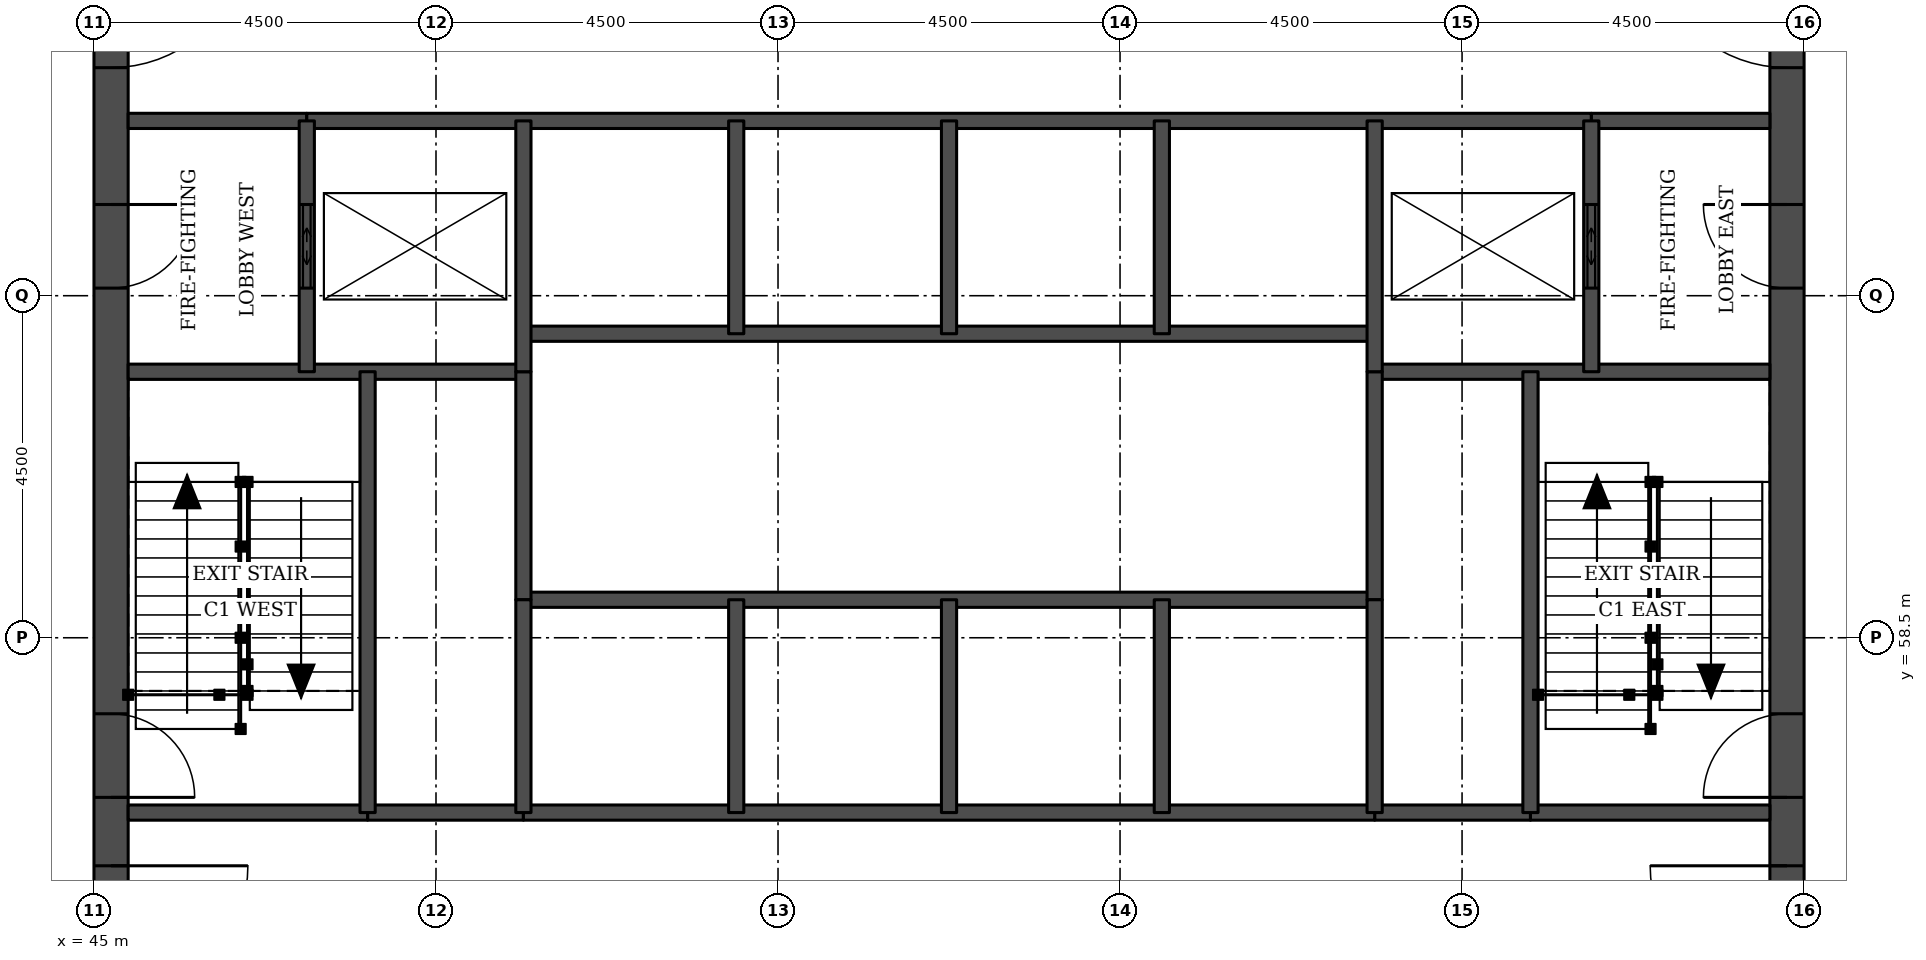
"""IFC4 building model, lengths in metres.
Left out: names, types, materials, properties, quantities, classifications, styles, units other than length and angle.
Written with IfcOpenShell. Run it as: python <this file> out.ifc"""

import sys

from ifc_helpers import new_model, si_unit, direction, frame, frame_2d, origin, place, context, subcontext, project, spatial, rectangle, extrude, element, fill, save


model = new_model("IFC4")
c1 = context("Model", 3, precision=1e-05, world=origin(), true_north=direction((0.0, 1.0)))
c2 = subcontext(c1, "Body", "Model", "MODEL_VIEW")
j1 = project(units=[si_unit("LENGTHUNIT", "METRE"), si_unit("PLANEANGLEUNIT", "RADIAN")], contexts=[c1])
p1 = place(None, origin())
s1 = spatial("IfcSite", under=j1, at=p1, CompositionType="ELEMENT")
p2 = place(p1, origin())
s2 = spatial("IfcBuilding", under=s1, at=p2, CompositionType="ELEMENT")
p3 = place(p2, frame((0.0, 0.0, 127.0)))
s3 = spatial("IfcBuildingStorey", under=s2, at=p3, CompositionType="ELEMENT", Elevation=127.0)
p4 = place(p3, frame((45.225, 49.5, 0.0), z_axis=(0.0, 0.0, 1.0), x_axis=(0.0, 1.0, 0.0)))
e1 = element("IfcWall", 1, at=p4, inside=s3, PredefinedType="SHEAR", context=c2, shape_type="SweptSolid", body=[
    extrude(rectangle(XDim=22.5, YDim=0.45, at=frame_2d((11.25, 0.0))), origin(), (0.0, 0.0, 1.0), 3.7),
])
p5 = place(p4, frame((4.2, 0.0, 0.0)))
e2 = element("IfcOpeningElement", 2, at=p5, cuts=e1, PredefinedType="OPENING", context=c2, shape_type="SweptSolid", body=[
    extrude(rectangle(XDim=1.8, YDim=2.1, at=frame_2d((0.9, 1.05))), frame((0.0, 0.235, 0.0), z_axis=(0.0, -1.0, 0.0), x_axis=(1.0, 0.0, 0.0)), (0.0, 0.0, 1.0), 0.47),
])
p6 = place(p4, frame((6.9, 0.0, 0.0)))
e3 = element("IfcOpeningElement", 3, at=p6, cuts=e1, PredefinedType="OPENING", context=c2, shape_type="SweptSolid", body=[
    extrude(rectangle(XDim=1.1, YDim=2.1, at=frame_2d((0.55, 1.05))), frame((0.0, 0.235, 0.0), z_axis=(0.0, -1.0, 0.0), x_axis=(1.0, 0.0, 0.0)), (0.0, 0.0, 1.0), 0.47),
])
p7 = place(p4, frame((13.6, 0.0, 0.0)))
e4 = element("IfcOpeningElement", 4, at=p7, cuts=e1, PredefinedType="OPENING", context=c2, shape_type="SweptSolid", body=[
    extrude(rectangle(XDim=1.1, YDim=2.1, at=frame_2d((0.55, 1.05))), frame((0.0, 0.235, 0.0), z_axis=(0.0, -1.0, 0.0), x_axis=(1.0, 0.0, 0.0)), (0.0, 0.0, 1.0), 0.47),
])
p8 = place(p4, frame((16.5, 0.0, 0.0)))
e5 = element("IfcOpeningElement", 5, at=p8, cuts=e1, PredefinedType="OPENING", context=c2, shape_type="SweptSolid", body=[
    extrude(rectangle(XDim=1.8, YDim=2.1, at=frame_2d((0.9, 1.05))), frame((0.0, 0.235, 0.0), z_axis=(0.0, -1.0, 0.0), x_axis=(1.0, 0.0, 0.0)), (0.0, 0.0, 1.0), 0.47),
])
p9 = place(p3, frame((67.275, 49.5, 0.0), z_axis=(0.0, 0.0, 1.0), x_axis=(0.0, 1.0, 0.0)))
e6 = element("IfcWall", 6, at=p9, inside=s3, PredefinedType="SHEAR", context=c2, shape_type="SweptSolid", body=[
    extrude(rectangle(XDim=22.5, YDim=0.45, at=frame_2d((11.25, 0.0))), origin(), (0.0, 0.0, 1.0), 3.7),
])
p10 = place(p9, frame((4.2, 0.0, 0.0)))
e7 = element("IfcOpeningElement", 7, at=p10, cuts=e6, PredefinedType="OPENING", context=c2, shape_type="SweptSolid", body=[
    extrude(rectangle(XDim=1.8, YDim=2.1, at=frame_2d((0.9, 1.05))), frame((0.0, 0.235, 0.0), z_axis=(0.0, -1.0, 0.0), x_axis=(1.0, 0.0, 0.0)), (0.0, 0.0, 1.0), 0.47),
])
p11 = place(p9, frame((6.9, 0.0, 0.0)))
e8 = element("IfcOpeningElement", 8, at=p11, cuts=e6, PredefinedType="OPENING", context=c2, shape_type="SweptSolid", body=[
    extrude(rectangle(XDim=1.1, YDim=2.1, at=frame_2d((0.55, 1.05))), frame((0.0, 0.235, 0.0), z_axis=(0.0, -1.0, 0.0), x_axis=(1.0, 0.0, 0.0)), (0.0, 0.0, 1.0), 0.47),
])
p12 = place(p9, frame((13.6, 0.0, 0.0)))
e9 = element("IfcOpeningElement", 9, at=p12, cuts=e6, PredefinedType="OPENING", context=c2, shape_type="SweptSolid", body=[
    extrude(rectangle(XDim=1.1, YDim=2.1, at=frame_2d((0.55, 1.05))), frame((0.0, 0.235, 0.0), z_axis=(0.0, -1.0, 0.0), x_axis=(1.0, 0.0, 0.0)), (0.0, 0.0, 1.0), 0.47),
])
p13 = place(p9, frame((16.5, 0.0, 0.0)))
e10 = element("IfcOpeningElement", 10, at=p13, cuts=e6, PredefinedType="OPENING", context=c2, shape_type="SweptSolid", body=[
    extrude(rectangle(XDim=1.8, YDim=2.1, at=frame_2d((0.9, 1.05))), frame((0.0, 0.235, 0.0), z_axis=(0.0, -1.0, 0.0), x_axis=(1.0, 0.0, 0.0)), (0.0, 0.0, 1.0), 0.47),
])
for number, where, z_axis, x_axis in (
    (11, (48.6, 56.2, 0.0), (0.0, 0.0, 1.0), (1.0, 0.0, 0.0)),
    (12, (61.85, 56.2, 0.0), (0.0, 0.0, 1.0), (1.0, 0.0, 0.0)),
):
    element("IfcWall", number, at=place(p3, frame(where, z_axis=z_axis, x_axis=x_axis)), inside=s3, PredefinedType="SOLIDWALL", context=c2, shape_type="SweptSolid", body=[
        extrude(rectangle(XDim=2.05, YDim=0.2, at=frame_2d((1.025, 0.0))), origin(), (0.0, 0.0, 1.0), 3.55),
    ])
p14 = place(p3, frame((45.45, 56.2, 0.0), z_axis=(0.0, 0.0, 1.0), x_axis=(1.0, 0.0, 0.0)))
e13 = element("IfcWall", 13, at=p14, inside=s3, PredefinedType="SOLIDWALL", context=c2, shape_type="SweptSolid", body=[
    extrude(rectangle(XDim=3.15, YDim=0.2, at=frame_2d((1.575, 0.0))), origin(), (0.0, 0.0, 1.0), 3.55),
])
p15 = place(p3, frame((50.65, 56.2, 0.0), z_axis=(0.0, 0.0, 1.0), x_axis=(1.0, 0.0, 0.0)))
e14 = element("IfcWall", 14, at=p15, inside=s3, PredefinedType="SOLIDWALL", context=c2, shape_type="SweptSolid", body=[
    extrude(rectangle(XDim=11.2, YDim=0.2, at=frame_2d((5.6, 0.0))), origin(), (0.0, 0.0, 1.0), 3.55),
])
p16 = place(p3, frame((63.9, 56.2, 0.0), z_axis=(0.0, 0.0, 1.0), x_axis=(1.0, 0.0, 0.0)))
e15 = element("IfcWall", 15, at=p16, inside=s3, PredefinedType="SOLIDWALL", context=c2, shape_type="SweptSolid", body=[
    extrude(rectangle(XDim=3.15, YDim=0.2, at=frame_2d((1.575, 0.0))), origin(), (0.0, 0.0, 1.0), 3.55),
])
p17 = place(p3, frame((50.65, 59.0, 0.0), z_axis=(0.0, 0.0, 1.0), x_axis=(1.0, 0.0, 0.0)))
e16 = element("IfcWall", 16, at=p17, inside=s3, PredefinedType="SOLIDWALL", context=c2, shape_type="SweptSolid", body=[
    extrude(rectangle(XDim=11.2, YDim=0.2, at=frame_2d((5.6, 0.0))), origin(), (0.0, 0.0, 1.0), 3.7),
])
for number, where, z_axis, x_axis in (
    (17, (45.45, 62.0, 0.0), (0.0, 0.0, 1.0), (1.0, 0.0, 0.0)),
    (18, (61.85, 62.0, 0.0), (0.0, 0.0, 1.0), (1.0, 0.0, 0.0)),
):
    element("IfcWall", number, at=place(p3, frame(where, z_axis=z_axis, x_axis=x_axis)), inside=s3, PredefinedType="SOLIDWALL", context=c2, shape_type="SweptSolid", body=[
        extrude(rectangle(XDim=5.2, YDim=0.2, at=frame_2d((2.6, 0.0))), origin(), (0.0, 0.0, 1.0), 3.55),
    ])
p18 = place(p3, frame((50.65, 62.5, 0.0), z_axis=(0.0, 0.0, 1.0), x_axis=(1.0, 0.0, 0.0)))
e19 = element("IfcWall", 19, at=p18, inside=s3, PredefinedType="SOLIDWALL", context=c2, shape_type="SweptSolid", body=[
    extrude(rectangle(XDim=11.2, YDim=0.2, at=frame_2d((5.6, 0.0))), origin(), (0.0, 0.0, 1.0), 3.7),
])
for number, where, z_axis, x_axis in (
    (20, (45.45, 65.3, 0.0), (0.0, 0.0, 1.0), (1.0, 0.0, 0.0)),
    (21, (64.7, 65.3, 0.0), (0.0, 0.0, 1.0), (1.0, 0.0, 0.0)),
):
    element("IfcWall", number, at=place(p3, frame(where, z_axis=z_axis, x_axis=x_axis)), inside=s3, PredefinedType="SOLIDWALL", context=c2, shape_type="SweptSolid", body=[
        extrude(rectangle(XDim=2.35, YDim=0.2, at=frame_2d((1.175, 0.0))), origin(), (0.0, 0.0, 1.0), 3.55),
    ])
p19 = place(p3, frame((47.8, 65.3, 0.0), z_axis=(0.0, 0.0, 1.0), x_axis=(1.0, 0.0, 0.0)))
e22 = element("IfcWall", 22, at=p19, inside=s3, PredefinedType="SOLIDWALL", context=c2, shape_type="SweptSolid", body=[
    extrude(rectangle(XDim=16.9, YDim=0.2, at=frame_2d((8.45, 0.0))), origin(), (0.0, 0.0, 1.0), 3.55),
])
p20 = place(p3, frame((47.8, 62.0, 0.0), z_axis=(0.0, 0.0, 1.0), x_axis=(0.0, 1.0, 0.0)))
e23 = element("IfcWall", 23, at=p20, inside=s3, PredefinedType="SOLIDWALL", context=c2, shape_type="SweptSolid", body=[
    extrude(rectangle(XDim=3.3, YDim=0.2, at=frame_2d((1.65, 0.0))), origin(), (0.0, 0.0, 1.0), 3.55),
])
p21 = place(p20, frame((1.1, 0.0, 0.0)))
e24 = element("IfcOpeningElement", 24, at=p21, cuts=e23, PredefinedType="OPENING", context=c2, shape_type="SweptSolid", body=[
    extrude(rectangle(XDim=1.1, YDim=2.1, at=frame_2d((0.55, 1.05))), frame((0.0, 0.11, 0.0), z_axis=(0.0, -1.0, 0.0), x_axis=(1.0, 0.0, 0.0)), (0.0, 0.0, 1.0), 0.22),
])
p22 = place(p3, frame((48.6, 56.2, 0.0), z_axis=(0.0, 0.0, 1.0), x_axis=(0.0, 1.0, 0.0)))
e25 = element("IfcWall", 25, at=p22, inside=s3, PredefinedType="SOLIDWALL", context=c2, shape_type="SweptSolid", body=[
    extrude(rectangle(XDim=5.8, YDim=0.2, at=frame_2d((2.9, 0.0))), origin(), (0.0, 0.0, 1.0), 3.55),
])
p23 = place(p3, frame((50.65, 59.0, 0.0), z_axis=(0.0, 0.0, 1.0), x_axis=(0.0, 1.0, 0.0)))
e26 = element("IfcWall", 26, at=p23, inside=s3, PredefinedType="SOLIDWALL", context=c2, shape_type="SweptSolid", body=[
    extrude(rectangle(XDim=3.0, YDim=0.2, at=frame_2d((1.5, 0.0))), origin(), (0.0, 0.0, 1.0), 3.7),
])
p24 = place(p3, frame((50.65, 56.2, 0.0), z_axis=(0.0, 0.0, 1.0), x_axis=(0.0, 1.0, 0.0)))
e27 = element("IfcWall", 27, at=p24, inside=s3, PredefinedType="SOLIDWALL", context=c2, shape_type="SweptSolid", body=[
    extrude(rectangle(XDim=2.8, YDim=0.2, at=frame_2d((1.4, 0.0))), origin(), (0.0, 0.0, 1.0), 3.55),
])
p25 = place(p3, frame((50.65, 62.0, 0.0), z_axis=(0.0, 0.0, 1.0), x_axis=(0.0, 1.0, 0.0)))
e28 = element("IfcWall", 28, at=p25, inside=s3, PredefinedType="SOLIDWALL", context=c2, shape_type="SweptSolid", body=[
    extrude(rectangle(XDim=3.3, YDim=0.2, at=frame_2d((1.65, 0.0))), origin(), (0.0, 0.0, 1.0), 3.55),
])
for number, where, z_axis, x_axis in (
    (29, (53.45, 56.2, 0.0), (0.0, 0.0, 1.0), (0.0, 1.0, 0.0)),
    (30, (53.45, 62.5, 0.0), (0.0, 0.0, 1.0), (0.0, 1.0, 0.0)),
    (31, (56.25, 56.2, 0.0), (0.0, 0.0, 1.0), (0.0, 1.0, 0.0)),
    (32, (56.25, 62.5, 0.0), (0.0, 0.0, 1.0), (0.0, 1.0, 0.0)),
    (33, (59.05, 56.2, 0.0), (0.0, 0.0, 1.0), (0.0, 1.0, 0.0)),
    (34, (59.05, 62.5, 0.0), (0.0, 0.0, 1.0), (0.0, 1.0, 0.0)),
):
    element("IfcWall", number, at=place(p3, frame(where, z_axis=z_axis, x_axis=x_axis)), inside=s3, PredefinedType="SOLIDWALL", context=c2, shape_type="SweptSolid", body=[
        extrude(rectangle(XDim=2.8, YDim=0.2, at=frame_2d((1.4, 0.0))), origin(), (0.0, 0.0, 1.0), 3.55),
    ])
p26 = place(p3, frame((61.85, 59.0, 0.0), z_axis=(0.0, 0.0, 1.0), x_axis=(0.0, 1.0, 0.0)))
e35 = element("IfcWall", 35, at=p26, inside=s3, PredefinedType="SOLIDWALL", context=c2, shape_type="SweptSolid", body=[
    extrude(rectangle(XDim=3.0, YDim=0.2, at=frame_2d((1.5, 0.0))), origin(), (0.0, 0.0, 1.0), 3.7),
])
p27 = place(p3, frame((61.85, 56.2, 0.0), z_axis=(0.0, 0.0, 1.0), x_axis=(0.0, 1.0, 0.0)))
e36 = element("IfcWall", 36, at=p27, inside=s3, PredefinedType="SOLIDWALL", context=c2, shape_type="SweptSolid", body=[
    extrude(rectangle(XDim=2.8, YDim=0.2, at=frame_2d((1.4, 0.0))), origin(), (0.0, 0.0, 1.0), 3.55),
])
p28 = place(p3, frame((61.85, 62.0, 0.0), z_axis=(0.0, 0.0, 1.0), x_axis=(0.0, 1.0, 0.0)))
e37 = element("IfcWall", 37, at=p28, inside=s3, PredefinedType="SOLIDWALL", context=c2, shape_type="SweptSolid", body=[
    extrude(rectangle(XDim=3.3, YDim=0.2, at=frame_2d((1.65, 0.0))), origin(), (0.0, 0.0, 1.0), 3.55),
])
p29 = place(p3, frame((63.9, 56.2, 0.0), z_axis=(0.0, 0.0, 1.0), x_axis=(0.0, 1.0, 0.0)))
e38 = element("IfcWall", 38, at=p29, inside=s3, PredefinedType="SOLIDWALL", context=c2, shape_type="SweptSolid", body=[
    extrude(rectangle(XDim=5.8, YDim=0.2, at=frame_2d((2.9, 0.0))), origin(), (0.0, 0.0, 1.0), 3.55),
])
p30 = place(p3, frame((64.7, 62.0, 0.0), z_axis=(0.0, 0.0, 1.0), x_axis=(0.0, 1.0, 0.0)))
e39 = element("IfcWall", 39, at=p30, inside=s3, PredefinedType="SOLIDWALL", context=c2, shape_type="SweptSolid", body=[
    extrude(rectangle(XDim=3.3, YDim=0.2, at=frame_2d((1.65, 0.0))), origin(), (0.0, 0.0, 1.0), 3.55),
])
p31 = place(p30, frame((1.1, 0.0, 0.0)))
e40 = element("IfcOpeningElement", 40, at=p31, cuts=e39, PredefinedType="OPENING", context=c2, shape_type="SweptSolid", body=[
    extrude(rectangle(XDim=1.1, YDim=2.1, at=frame_2d((0.55, 1.05))), frame((0.0, 0.11, 0.0), z_axis=(0.0, -1.0, 0.0), x_axis=(1.0, 0.0, 0.0)), (0.0, 0.0, 1.0), 0.22),
])
p32 = place(p21, origin())
e41 = element("IfcDoor", 41, at=p32, inside=s3, OperationType="DOUBLE_DOOR_SLIDING", PredefinedType="DOOR", context=c2, shape_type="SweptSolid", body=[
    extrude(rectangle(XDim=1.1, YDim=2.1, at=frame_2d((0.55, 1.05))), frame((0.0, 0.025, 0.0), z_axis=(0.0, -1.0, 0.0), x_axis=(1.0, 0.0, 0.0)), (0.0, 0.0, 1.0), 0.05),
])
fill(e24, e41)
p33 = place(p31, origin())
e42 = element("IfcDoor", 42, at=p33, inside=s3, OperationType="DOUBLE_DOOR_SLIDING", PredefinedType="DOOR", context=c2, shape_type="SweptSolid", body=[
    extrude(rectangle(XDim=1.1, YDim=2.1, at=frame_2d((0.55, 1.05))), frame((0.0, 0.025, 0.0), z_axis=(0.0, -1.0, 0.0), x_axis=(1.0, 0.0, 0.0)), (0.0, 0.0, 1.0), 0.05),
])
fill(e40, e42)
p34 = place(p5, frame((1.8, 0.0, 0.0), z_axis=(0.0, 0.0, 1.0), x_axis=(-1.0, 0.0, 0.0)))
e43 = element("IfcDoor", 43, at=p34, inside=s3, OperationType="SINGLE_SWING_LEFT", PredefinedType="DOOR", context=c2, shape_type="SweptSolid", body=[
    extrude(rectangle(XDim=1.8, YDim=2.1, at=frame_2d((0.9, 1.05))), frame((0.0, 0.025, 0.0), z_axis=(0.0, -1.0, 0.0), x_axis=(1.0, 0.0, 0.0)), (0.0, 0.0, 1.0), 0.05),
])
fill(e2, e43)
p35 = place(p6, frame((1.1, 0.0, 0.0), z_axis=(0.0, 0.0, 1.0), x_axis=(-1.0, 0.0, 0.0)))
e44 = element("IfcDoor", 44, at=p35, inside=s3, OperationType="SINGLE_SWING_RIGHT", PredefinedType="DOOR", context=c2, shape_type="SweptSolid", body=[
    extrude(rectangle(XDim=1.1, YDim=2.1, at=frame_2d((0.55, 1.05))), frame((0.0, 0.025, 0.0), z_axis=(0.0, -1.0, 0.0), x_axis=(1.0, 0.0, 0.0)), (0.0, 0.0, 1.0), 0.05),
])
fill(e3, e44)
p36 = place(p7, frame((1.1, 0.0, 0.0), z_axis=(0.0, 0.0, 1.0), x_axis=(-1.0, 0.0, 0.0)))
e45 = element("IfcDoor", 45, at=p36, inside=s3, OperationType="SINGLE_SWING_LEFT", PredefinedType="DOOR", context=c2, shape_type="SweptSolid", body=[
    extrude(rectangle(XDim=1.1, YDim=2.1, at=frame_2d((0.55, 1.05))), frame((0.0, 0.025, 0.0), z_axis=(0.0, -1.0, 0.0), x_axis=(1.0, 0.0, 0.0)), (0.0, 0.0, 1.0), 0.05),
])
fill(e4, e45)
p37 = place(p8, frame((1.8, 0.0, 0.0), z_axis=(0.0, 0.0, 1.0), x_axis=(-1.0, 0.0, 0.0)))
e46 = element("IfcDoor", 46, at=p37, inside=s3, OperationType="SINGLE_SWING_LEFT", PredefinedType="DOOR", context=c2, shape_type="SweptSolid", body=[
    extrude(rectangle(XDim=1.8, YDim=2.1, at=frame_2d((0.9, 1.05))), frame((0.0, 0.025, 0.0), z_axis=(0.0, -1.0, 0.0), x_axis=(1.0, 0.0, 0.0)), (0.0, 0.0, 1.0), 0.05),
])
fill(e5, e46)
p38 = place(p10, origin())
e47 = element("IfcDoor", 47, at=p38, inside=s3, OperationType="SINGLE_SWING_RIGHT", PredefinedType="DOOR", context=c2, shape_type="SweptSolid", body=[
    extrude(rectangle(XDim=1.8, YDim=2.1, at=frame_2d((0.9, 1.05))), frame((0.0, 0.025, 0.0), z_axis=(0.0, -1.0, 0.0), x_axis=(1.0, 0.0, 0.0)), (0.0, 0.0, 1.0), 0.05),
])
fill(e7, e47)
p39 = place(p11, origin())
e48 = element("IfcDoor", 48, at=p39, inside=s3, OperationType="SINGLE_SWING_LEFT", PredefinedType="DOOR", context=c2, shape_type="SweptSolid", body=[
    extrude(rectangle(XDim=1.1, YDim=2.1, at=frame_2d((0.55, 1.05))), frame((0.0, 0.025, 0.0), z_axis=(0.0, -1.0, 0.0), x_axis=(1.0, 0.0, 0.0)), (0.0, 0.0, 1.0), 0.05),
])
fill(e8, e48)
p40 = place(p12, origin())
e49 = element("IfcDoor", 49, at=p40, inside=s3, OperationType="SINGLE_SWING_RIGHT", PredefinedType="DOOR", context=c2, shape_type="SweptSolid", body=[
    extrude(rectangle(XDim=1.1, YDim=2.1, at=frame_2d((0.55, 1.05))), frame((0.0, 0.025, 0.0), z_axis=(0.0, -1.0, 0.0), x_axis=(1.0, 0.0, 0.0)), (0.0, 0.0, 1.0), 0.05),
])
fill(e9, e49)
p41 = place(p13, origin())
e50 = element("IfcDoor", 50, at=p41, inside=s3, OperationType="SINGLE_SWING_RIGHT", PredefinedType="DOOR", context=c2, shape_type="SweptSolid", body=[
    extrude(rectangle(XDim=1.8, YDim=2.1, at=frame_2d((0.9, 1.05))), frame((0.0, 0.025, 0.0), z_axis=(0.0, -1.0, 0.0), x_axis=(1.0, 0.0, 0.0)), (0.0, 0.0, 1.0), 0.05),
])
fill(e10, e50)
save(model, sys.argv[1])
